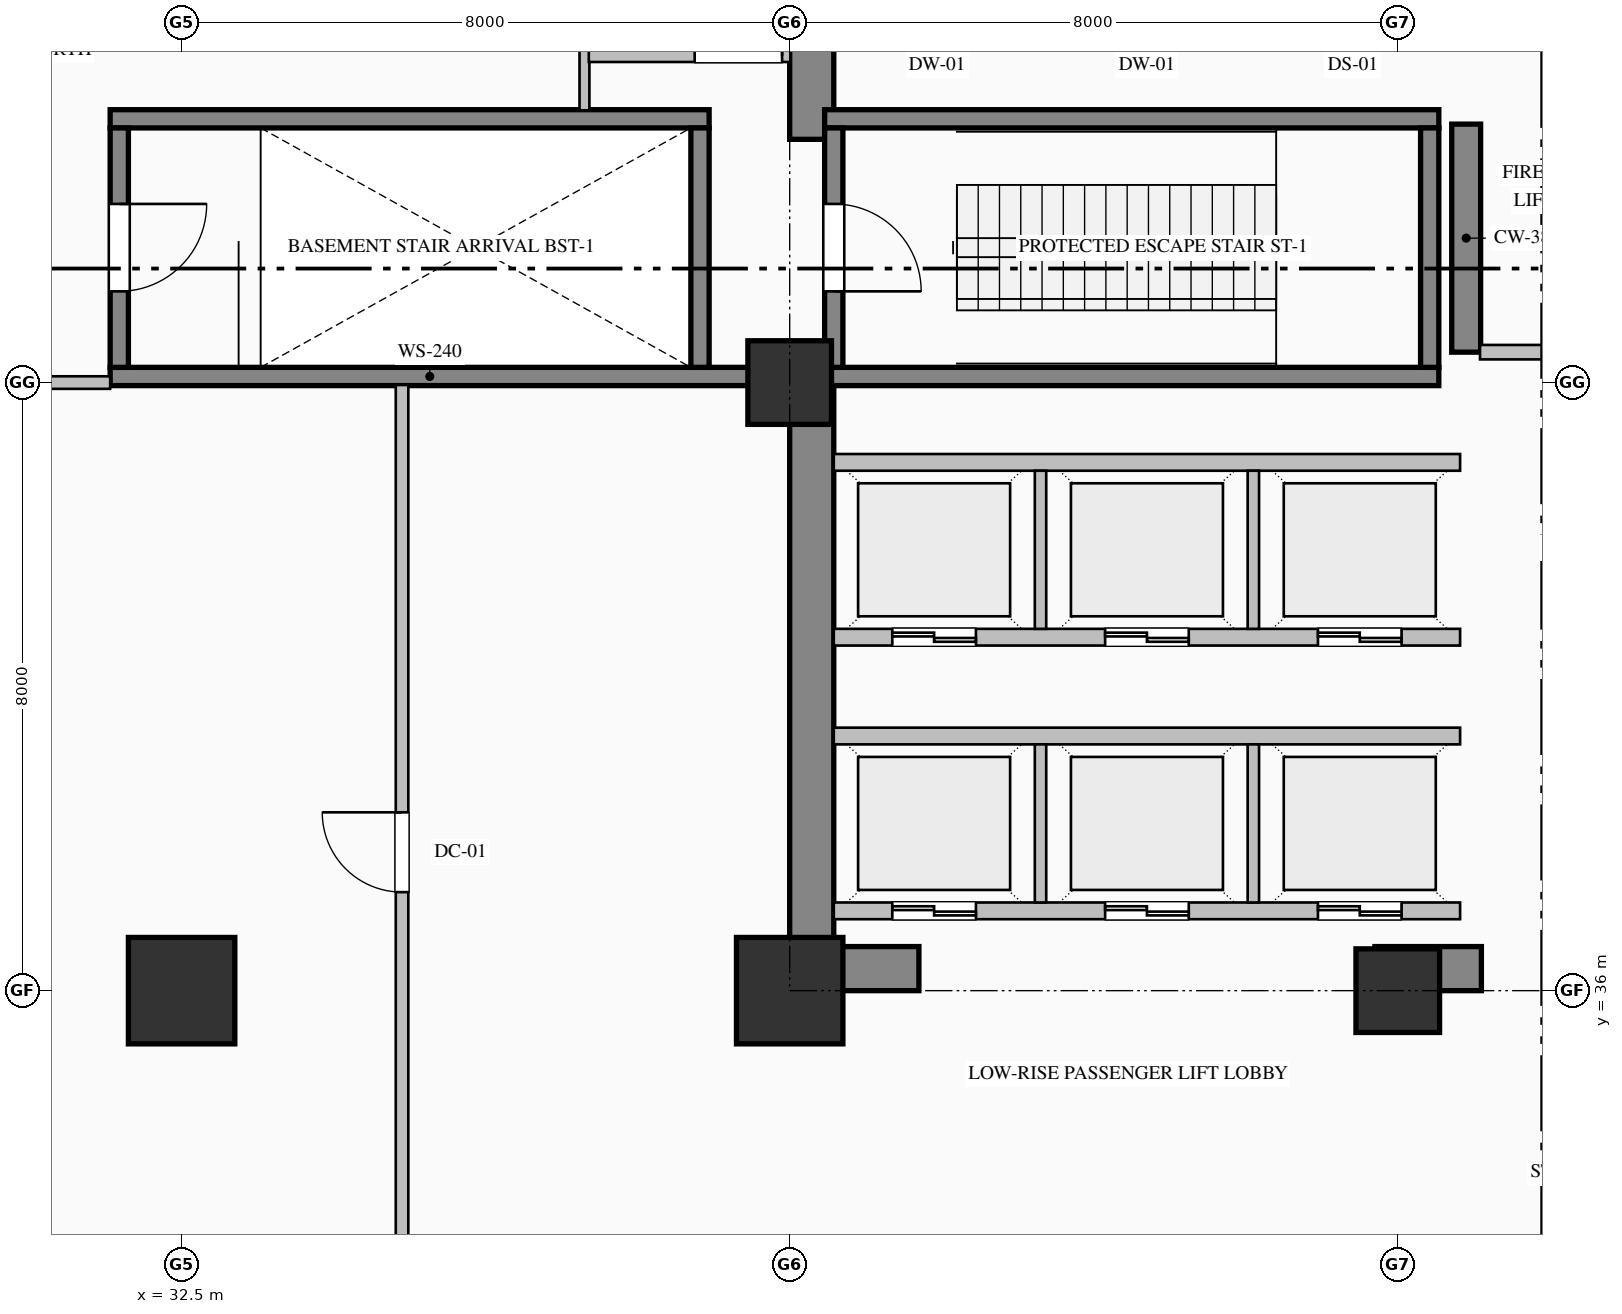
"""IFC4 building model, lengths in metres.
Left out: names, types, materials, properties, quantities, classifications, styles, units other than length and angle.
Written with IfcOpenShell. Run it as: python <this file> out.ifc"""

import sys

from ifc_helpers import new_model, si_unit, direction, frame, frame_2d, origin, origin_2d, place, context, subcontext, project, spatial, rectangle, hollow_rectangle, extrude, element, fill, save


model = new_model("IFC4")
c1 = context("Model", 3, precision=1e-05, world=origin(), true_north=direction((0.0, 1.0)))
c2 = subcontext(c1, "Body", "Model", "MODEL_VIEW")
j1 = project(units=[si_unit("LENGTHUNIT", "METRE"), si_unit("PLANEANGLEUNIT", "RADIAN")], contexts=[c1])
p1 = place(None, origin())
s1 = spatial("IfcSite", under=j1, at=p1, CompositionType="ELEMENT")
p2 = place(p1, origin())
s2 = spatial("IfcBuilding", under=s1, at=p2, CompositionType="ELEMENT")
p3 = place(p2, origin())
s3 = spatial("IfcBuildingStorey", under=s2, at=p3, CompositionType="ELEMENT", Elevation=0.0)
p4 = place(p3, frame((40.79, 36.58, 0.0), z_axis=(0.0, 0.0, 1.0), x_axis=(0.0, 1.0, 0.0)))
e1 = element("IfcWall", 1, at=p4, inside=s3, PredefinedType="SHEAR", context=c2, shape_type="SweptSolid", body=[
    extrude(rectangle(XDim=7.82, YDim=0.58, at=frame_2d((3.91, 0.0))), origin(), (0.0, 0.0, 1.0), 5.72),
])
p5 = place(p3, frame((40.79, 47.2, 0.0), z_axis=(0.0, 0.0, 1.0), x_axis=(0.0, 1.0, 0.0)))
e2 = element("IfcWall", 2, at=p5, inside=s3, PredefinedType="SHEAR", context=c2, shape_type="SweptSolid", body=[
    extrude(rectangle(XDim=4.22, YDim=0.58, at=frame_2d((2.11, 0.0))), origin(), (0.0, 0.0, 1.0), 5.72),
])
p6 = place(p3, frame((40.5, 36.29, 0.0), z_axis=(0.0, 0.0, 1.0), x_axis=(1.0, 0.0, 0.0)))
e3 = element("IfcWall", 3, at=p6, inside=s3, PredefinedType="SHEAR", context=c2, shape_type="SweptSolid", body=[
    extrude(rectangle(XDim=1.7, YDim=0.58, at=frame_2d((0.85, 0.0))), origin(), (0.0, 0.0, 1.0), 5.72),
])
p7 = place(p3, frame((48.2, 36.29, 0.0), z_axis=(0.0, 0.0, 1.0), x_axis=(1.0, 0.0, 0.0)))
e4 = element("IfcWall", 4, at=p7, inside=s3, PredefinedType="SHEAR", context=c2, shape_type="SweptSolid", body=[
    extrude(rectangle(XDim=1.4, YDim=0.58, at=frame_2d((0.7, 0.0))), origin(), (0.0, 0.0, 1.0), 5.72),
])
p8 = place(p3, frame((49.4, 44.4, 0.0), z_axis=(0.0, 0.0, 1.0), x_axis=(0.0, 1.0, 0.0)))
e5 = element("IfcWall", 5, at=p8, inside=s3, PredefinedType="SHEAR", context=c2, shape_type="SweptSolid", body=[
    extrude(rectangle(XDim=3.0, YDim=0.38, at=frame_2d((1.5, 0.0))), origin(), (0.0, 0.0, 1.0), 5.72),
])
for number, where, z_axis, x_axis in (
    (6, (32.5, 36.0, 0.0), (0.0, 0.0, 1.0), (1.0, 0.0, 0.0)),
    (7, (40.5, 36.0, 0.0), (0.0, 0.0, 1.0), (1.0, 0.0, 0.0)),
):
    element("IfcColumn", number, at=place(p3, frame(where, z_axis=z_axis, x_axis=x_axis)), inside=s3, PredefinedType="COLUMN", context=c2, shape_type="SweptSolid", body=[
        extrude(hollow_rectangle(XDim=1.4, YDim=1.4, WallThickness=0.05, at=origin_2d()), origin(), (0.0, 0.0, 1.0), 6.0),
    ])
for number, where, z_axis, x_axis in (
    (8, (40.5, 44.0, 0.0), (0.0, 0.0, 1.0), (1.0, 0.0, 0.0)),
    (9, (48.5, 36.0, 0.0), (0.0, 0.0, 1.0), (1.0, 0.0, 0.0)),
):
    element("IfcColumn", number, at=place(p3, frame(where, z_axis=z_axis, x_axis=x_axis)), inside=s3, PredefinedType="COLUMN", context=c2, shape_type="SweptSolid", body=[
        extrude(rectangle(XDim=1.1, YDim=1.1, at=origin_2d()), origin(), (0.0, 0.0, 1.0), 6.0),
    ])
for number, where, z_axis, x_axis in (
    (10, (40.96, 47.47, 0.0), (0.0, 0.0, 1.0), (1.0, 0.0, 0.0)),
    (11, (49.04, 44.08, 0.0), (0.0, 0.0, 1.0), (-1.0, 0.0, 0.0)),
):
    element("IfcWall", number, at=place(p3, frame(where, z_axis=z_axis, x_axis=x_axis)), inside=s3, PredefinedType="SOLIDWALL", context=c2, shape_type="SweptSolid", body=[
        extrude(rectangle(XDim=8.08, YDim=0.24, at=frame_2d((4.04, 0.0))), origin(), (0.0, 0.0, 1.0), 6.0),
    ])
p9 = place(p3, frame((41.08, 47.35, 0.0), z_axis=(0.0, 0.0, 1.0), x_axis=(0.0, -1.0, 0.0)))
e12 = element("IfcWall", 12, at=p9, inside=s3, PredefinedType="SOLIDWALL", context=c2, shape_type="SweptSolid", body=[
    extrude(rectangle(XDim=3.15, YDim=0.24, at=frame_2d((1.575, 0.0))), origin(), (0.0, 0.0, 1.0), 6.0),
])
p10 = place(p9, frame((1.0, 0.0, 0.0)))
e13 = element("IfcOpeningElement", 13, at=p10, cuts=e12, PredefinedType="OPENING", context=c2, shape_type="SweptSolid", body=[
    extrude(rectangle(XDim=1.15, YDim=2.2, at=frame_2d((0.575, 1.1))), frame((0.0, 0.13, 0.0), z_axis=(0.0, -1.0, 0.0), x_axis=(1.0, 0.0, 0.0)), (0.0, 0.0, 1.0), 0.26),
])
p11 = place(p3, frame((48.92, 44.2, 0.0), z_axis=(0.0, 0.0, 1.0), x_axis=(0.0, 1.0, 0.0)))
e14 = element("IfcWall", 14, at=p11, inside=s3, PredefinedType="SOLIDWALL", context=c2, shape_type="SweptSolid", body=[
    extrude(rectangle(XDim=3.15, YDim=0.24, at=frame_2d((1.575, 0.0))), origin(), (0.0, 0.0, 1.0), 6.0),
])
p12 = place(p3, frame((31.56, 47.47, 0.0), z_axis=(0.0, 0.0, 1.0), x_axis=(1.0, 0.0, 0.0)))
e15 = element("IfcWall", 15, at=p12, inside=s3, PredefinedType="SOLIDWALL", context=c2, shape_type="SweptSolid", body=[
    extrude(rectangle(XDim=7.88, YDim=0.24, at=frame_2d((3.94, 0.0))), origin(), (0.0, 0.0, 1.0), 6.0),
])
p13 = place(p3, frame((39.97, 44.08, 0.0), z_axis=(0.0, 0.0, 1.0), x_axis=(-1.0, 0.0, 0.0)))
e16 = element("IfcWall", 16, at=p13, inside=s3, PredefinedType="SOLIDWALL", context=c2, shape_type="SweptSolid", body=[
    extrude(rectangle(XDim=8.41, YDim=0.24, at=frame_2d((4.205, 0.0))), origin(), (0.0, 0.0, 1.0), 6.0),
])
p14 = place(p3, frame((31.68, 47.35, 0.0), z_axis=(0.0, 0.0, 1.0), x_axis=(0.0, -1.0, 0.0)))
e17 = element("IfcWall", 17, at=p14, inside=s3, PredefinedType="SOLIDWALL", context=c2, shape_type="SweptSolid", body=[
    extrude(rectangle(XDim=3.15, YDim=0.24, at=frame_2d((1.575, 0.0))), origin(), (0.0, 0.0, 1.0), 6.0),
])
p15 = place(p14, frame((1.0, 0.0, 0.0)))
e18 = element("IfcOpeningElement", 18, at=p15, cuts=e17, PredefinedType="OPENING", context=c2, shape_type="SweptSolid", body=[
    extrude(rectangle(XDim=1.15, YDim=2.2, at=frame_2d((0.575, 1.1))), frame((0.0, 0.13, 0.0), z_axis=(0.0, -1.0, 0.0), x_axis=(1.0, 0.0, 0.0)), (0.0, 0.0, 1.0), 0.26),
])
p16 = place(p3, frame((39.32, 44.2, 0.0), z_axis=(0.0, 0.0, 1.0), x_axis=(0.0, 1.0, 0.0)))
e19 = element("IfcWall", 19, at=p16, inside=s3, PredefinedType="SOLIDWALL", context=c2, shape_type="SweptSolid", body=[
    extrude(rectangle(XDim=3.15, YDim=0.24, at=frame_2d((1.575, 0.0))), origin(), (0.0, 0.0, 1.0), 6.0),
])
p17 = place(p3, frame((49.32, 37.05, 0.0), z_axis=(0.0, 0.0, 1.0), x_axis=(-1.0, 0.0, 0.0)))
e20 = element("IfcWall", 20, at=p17, inside=s3, PredefinedType="PARTITIONING", context=c2, shape_type="SweptSolid", body=[
    extrude(rectangle(XDim=8.24, YDim=0.22, at=frame_2d((4.12, 0.0))), origin(), (0.0, 0.0, 1.0), 5.72),
])
p18 = place(p17, frame((6.37, 0.0, 0.0)))
e21 = element("IfcOpeningElement", 21, at=p18, cuts=e20, PredefinedType="OPENING", context=c2, shape_type="SweptSolid", body=[
    extrude(rectangle(XDim=1.1, YDim=2.2, at=frame_2d((0.55, 1.1))), frame((0.0, 0.12, 0.0), z_axis=(0.0, -1.0, 0.0), x_axis=(1.0, 0.0, 0.0)), (0.0, 0.0, 1.0), 0.24),
])
p19 = place(p17, frame((3.57, 0.0, 0.0)))
e22 = element("IfcOpeningElement", 22, at=p19, cuts=e20, PredefinedType="OPENING", context=c2, shape_type="SweptSolid", body=[
    extrude(rectangle(XDim=1.1, YDim=2.2, at=frame_2d((0.55, 1.1))), frame((0.0, 0.12, 0.0), z_axis=(0.0, -1.0, 0.0), x_axis=(1.0, 0.0, 0.0)), (0.0, 0.0, 1.0), 0.24),
])
p20 = place(p17, frame((0.77, 0.0, 0.0)))
e23 = element("IfcOpeningElement", 23, at=p20, cuts=e20, PredefinedType="OPENING", context=c2, shape_type="SweptSolid", body=[
    extrude(rectangle(XDim=1.1, YDim=2.2, at=frame_2d((0.55, 1.1))), frame((0.0, 0.12, 0.0), z_axis=(0.0, -1.0, 0.0), x_axis=(1.0, 0.0, 0.0)), (0.0, 0.0, 1.0), 0.24),
])
p21 = place(p3, frame((41.08, 39.35, 0.0), z_axis=(0.0, 0.0, 1.0), x_axis=(1.0, 0.0, 0.0)))
e24 = element("IfcWall", 24, at=p21, inside=s3, PredefinedType="PARTITIONING", context=c2, shape_type="SweptSolid", body=[
    extrude(rectangle(XDim=8.24, YDim=0.22, at=frame_2d((4.12, 0.0))), origin(), (0.0, 0.0, 1.0), 5.72),
])
for number, where, z_axis, x_axis in (
    (25, (43.8, 37.16, 0.0), (0.0, 0.0, 1.0), (0.0, 1.0, 0.0)),
    (26, (46.6, 37.16, 0.0), (0.0, 0.0, 1.0), (0.0, 1.0, 0.0)),
):
    element("IfcWall", number, at=place(p3, frame(where, z_axis=z_axis, x_axis=x_axis)), inside=s3, PredefinedType="PARTITIONING", context=c2, shape_type="SweptSolid", body=[
        extrude(rectangle(XDim=2.08, YDim=0.15, at=frame_2d((1.04, 0.0))), origin(), (0.0, 0.0, 1.0), 5.72),
    ])
p22 = place(p3, frame((49.32, 40.65, 0.0), z_axis=(0.0, 0.0, 1.0), x_axis=(-1.0, 0.0, 0.0)))
e27 = element("IfcWall", 27, at=p22, inside=s3, PredefinedType="PARTITIONING", context=c2, shape_type="SweptSolid", body=[
    extrude(rectangle(XDim=8.24, YDim=0.22, at=frame_2d((4.12, 0.0))), origin(), (0.0, 0.0, 1.0), 5.72),
])
p23 = place(p22, frame((6.37, 0.0, 0.0)))
e28 = element("IfcOpeningElement", 28, at=p23, cuts=e27, PredefinedType="OPENING", context=c2, shape_type="SweptSolid", body=[
    extrude(rectangle(XDim=1.1, YDim=2.2, at=frame_2d((0.55, 1.1))), frame((0.0, 0.12, 0.0), z_axis=(0.0, -1.0, 0.0), x_axis=(1.0, 0.0, 0.0)), (0.0, 0.0, 1.0), 0.24),
])
p24 = place(p22, frame((3.57, 0.0, 0.0)))
e29 = element("IfcOpeningElement", 29, at=p24, cuts=e27, PredefinedType="OPENING", context=c2, shape_type="SweptSolid", body=[
    extrude(rectangle(XDim=1.1, YDim=2.2, at=frame_2d((0.55, 1.1))), frame((0.0, 0.12, 0.0), z_axis=(0.0, -1.0, 0.0), x_axis=(1.0, 0.0, 0.0)), (0.0, 0.0, 1.0), 0.24),
])
p25 = place(p22, frame((0.77, 0.0, 0.0)))
e30 = element("IfcOpeningElement", 30, at=p25, cuts=e27, PredefinedType="OPENING", context=c2, shape_type="SweptSolid", body=[
    extrude(rectangle(XDim=1.1, YDim=2.2, at=frame_2d((0.55, 1.1))), frame((0.0, 0.12, 0.0), z_axis=(0.0, -1.0, 0.0), x_axis=(1.0, 0.0, 0.0)), (0.0, 0.0, 1.0), 0.24),
])
p26 = place(p3, frame((41.08, 42.95, 0.0), z_axis=(0.0, 0.0, 1.0), x_axis=(1.0, 0.0, 0.0)))
e31 = element("IfcWall", 31, at=p26, inside=s3, PredefinedType="PARTITIONING", context=c2, shape_type="SweptSolid", body=[
    extrude(rectangle(XDim=8.24, YDim=0.22, at=frame_2d((4.12, 0.0))), origin(), (0.0, 0.0, 1.0), 5.72),
])
for number, where, z_axis, x_axis in (
    (32, (43.8, 40.76, 0.0), (0.0, 0.0, 1.0), (0.0, 1.0, 0.0)),
    (33, (46.6, 40.76, 0.0), (0.0, 0.0, 1.0), (0.0, 1.0, 0.0)),
):
    element("IfcWall", number, at=place(p3, frame(where, z_axis=z_axis, x_axis=x_axis)), inside=s3, PredefinedType="PARTITIONING", context=c2, shape_type="SweptSolid", body=[
        extrude(rectangle(XDim=2.08, YDim=0.15, at=frame_2d((1.04, 0.0))), origin(), (0.0, 0.0, 1.0), 5.72),
    ])
p27 = place(p3, frame((37.8, 47.582, 0.0), z_axis=(0.0, 0.0, 1.0), x_axis=(0.0, 1.0, 0.0)))
e34 = element("IfcWall", 34, at=p27, inside=s3, PredefinedType="PARTITIONING", context=c2, shape_type="SweptSolid", body=[
    extrude(rectangle(XDim=4.046, YDim=0.13, at=frame_2d((2.023, 0.0))), origin(), (0.0, 0.0, 1.0), 5.72),
])
p28 = place(p27, frame((1.513, 0.0, 0.0)))
e35 = element("IfcOpeningElement", 35, at=p28, cuts=e34, PredefinedType="OPENING", context=c2, shape_type="SweptSolid", body=[
    extrude(rectangle(XDim=1.02, YDim=2.15, at=frame_2d((0.51, 1.075))), frame((0.0, 0.075, 0.0), z_axis=(0.0, -1.0, 0.0), x_axis=(1.0, 0.0, 0.0)), (0.0, 0.0, 1.0), 0.15),
])
p29 = place(p3, frame((54.718, 44.4, 0.0), z_axis=(0.0, 0.0, 1.0), x_axis=(-1.0, 0.0, 0.0)))
e36 = element("IfcWall", 36, at=p29, inside=s3, PredefinedType="PARTITIONING", context=c2, shape_type="SweptSolid", body=[
    extrude(rectangle(XDim=5.136, YDim=0.19, at=frame_2d((2.568, 0.0))), origin(), (0.0, 0.0, 1.0), 5.72),
])
p30 = place(p29, frame((2.043, 0.0, 0.0)))
e37 = element("IfcOpeningElement", 37, at=p30, cuts=e36, PredefinedType="OPENING", context=c2, shape_type="SweptSolid", body=[
    extrude(rectangle(XDim=1.05, YDim=2.15, at=frame_2d((0.525, 1.075))), frame((0.0, 0.105, 0.0), z_axis=(0.0, -1.0, 0.0), x_axis=(1.0, 0.0, 0.0)), (0.0, 0.0, 1.0), 0.21),
])
p31 = place(p3, frame((31.56, 44.0, 0.0), z_axis=(0.0, 0.0, 1.0), x_axis=(-1.0, 0.0, 0.0)))
e38 = element("IfcWall", 38, at=p31, inside=s3, PredefinedType="PARTITIONING", context=c2, shape_type="SweptSolid", body=[
    extrude(rectangle(XDim=2.76, YDim=0.165, at=frame_2d((1.38, 0.0))), origin(), (0.0, 0.0, 1.0), 5.72),
])
p32 = place(p31, frame((0.855, 0.0, 0.0)))
e39 = element("IfcOpeningElement", 39, at=p32, cuts=e38, PredefinedType="OPENING", context=c2, shape_type="SweptSolid", body=[
    extrude(rectangle(XDim=1.05, YDim=2.15, at=frame_2d((0.525, 1.075))), frame((0.0, 0.093, 0.0), z_axis=(0.0, -1.0, 0.0), x_axis=(1.0, 0.0, 0.0)), (0.0, 0.0, 1.0), 0.185),
])
p33 = place(p3, frame((35.4, 31.675, 0.0), z_axis=(0.0, 0.0, 1.0), x_axis=(0.0, 1.0, 0.0)))
e40 = element("IfcWall", 40, at=p33, inside=s3, PredefinedType="PARTITIONING", context=c2, shape_type="SweptSolid", body=[
    extrude(rectangle(XDim=12.293, YDim=0.165, at=frame_2d((6.147, 0.0))), origin(), (0.0, 0.0, 1.0), 5.72),
])
p34 = place(p33, frame((5.622, 0.0, 0.0)))
e41 = element("IfcOpeningElement", 41, at=p34, cuts=e40, PredefinedType="OPENING", context=c2, shape_type="SweptSolid", body=[
    extrude(rectangle(XDim=1.05, YDim=2.15, at=frame_2d((0.525, 1.075))), frame((0.0, 0.093, 0.0), z_axis=(0.0, -1.0, 0.0), x_axis=(1.0, 0.0, 0.0)), (0.0, 0.0, 1.0), 0.185),
])
p35 = place(p3, frame((37.857, 48.3, 0.0), z_axis=(0.0, 0.0, 1.0), x_axis=(1.0, 0.0, 0.0)))
e42 = element("IfcWall", 42, at=p35, inside=s3, PredefinedType="PARTITIONING", context=c2, shape_type="SweptSolid", body=[
    extrude(rectangle(XDim=2.651, YDim=0.165, at=frame_2d((1.326, 0.0))), origin(), (0.0, 0.0, 1.0), 5.72),
])
p36 = place(p35, frame((1.393, 0.0, 0.0)))
e43 = element("IfcOpeningElement", 43, at=p36, cuts=e42, PredefinedType="OPENING", context=c2, shape_type="SweptSolid", body=[
    extrude(rectangle(XDim=1.15, YDim=2.2, at=frame_2d((0.575, 1.1))), frame((0.0, 0.093, 0.0), z_axis=(0.0, -1.0, 0.0), x_axis=(1.0, 0.0, 0.0)), (0.0, 0.0, 1.0), 0.185),
])
p37 = place(p10, origin())
e44 = element("IfcDoor", 44, at=p37, inside=s3, OperationType="SINGLE_SWING_RIGHT", PredefinedType="DOOR", context=c2, shape_type="SweptSolid", body=[
    extrude(rectangle(XDim=1.15, YDim=2.2, at=frame_2d((0.575, 1.1))), frame((0.0, 0.025, 0.0), z_axis=(0.0, -1.0, 0.0), x_axis=(1.0, 0.0, 0.0)), (0.0, 0.0, 1.0), 0.05),
])
fill(e13, e44)
p38 = place(p15, origin())
e45 = element("IfcDoor", 45, at=p38, inside=s3, OperationType="SINGLE_SWING_LEFT", PredefinedType="DOOR", context=c2, shape_type="SweptSolid", body=[
    extrude(rectangle(XDim=1.15, YDim=2.2, at=frame_2d((0.575, 1.1))), frame((0.0, 0.025, 0.0), z_axis=(0.0, -1.0, 0.0), x_axis=(1.0, 0.0, 0.0)), (0.0, 0.0, 1.0), 0.05),
])
fill(e18, e45)
p39 = place(p18, origin())
e46 = element("IfcDoor", 46, at=p39, inside=s3, OperationType="DOUBLE_DOOR_SLIDING", PredefinedType="DOOR", context=c2, shape_type="SweptSolid", body=[
    extrude(rectangle(XDim=1.1, YDim=2.2, at=frame_2d((0.55, 1.1))), frame((0.0, 0.025, 0.0), z_axis=(0.0, -1.0, 0.0), x_axis=(1.0, 0.0, 0.0)), (0.0, 0.0, 1.0), 0.05),
])
fill(e21, e46)
p40 = place(p19, origin())
e47 = element("IfcDoor", 47, at=p40, inside=s3, OperationType="DOUBLE_DOOR_SLIDING", PredefinedType="DOOR", context=c2, shape_type="SweptSolid", body=[
    extrude(rectangle(XDim=1.1, YDim=2.2, at=frame_2d((0.55, 1.1))), frame((0.0, 0.025, 0.0), z_axis=(0.0, -1.0, 0.0), x_axis=(1.0, 0.0, 0.0)), (0.0, 0.0, 1.0), 0.05),
])
fill(e22, e47)
p41 = place(p20, origin())
e48 = element("IfcDoor", 48, at=p41, inside=s3, OperationType="DOUBLE_DOOR_SLIDING", PredefinedType="DOOR", context=c2, shape_type="SweptSolid", body=[
    extrude(rectangle(XDim=1.1, YDim=2.2, at=frame_2d((0.55, 1.1))), frame((0.0, 0.025, 0.0), z_axis=(0.0, -1.0, 0.0), x_axis=(1.0, 0.0, 0.0)), (0.0, 0.0, 1.0), 0.05),
])
fill(e23, e48)
p42 = place(p23, origin())
e49 = element("IfcDoor", 49, at=p42, inside=s3, OperationType="DOUBLE_DOOR_SLIDING", PredefinedType="DOOR", context=c2, shape_type="SweptSolid", body=[
    extrude(rectangle(XDim=1.1, YDim=2.2, at=frame_2d((0.55, 1.1))), frame((0.0, 0.025, 0.0), z_axis=(0.0, -1.0, 0.0), x_axis=(1.0, 0.0, 0.0)), (0.0, 0.0, 1.0), 0.05),
])
fill(e28, e49)
p43 = place(p24, origin())
e50 = element("IfcDoor", 50, at=p43, inside=s3, OperationType="DOUBLE_DOOR_SLIDING", PredefinedType="DOOR", context=c2, shape_type="SweptSolid", body=[
    extrude(rectangle(XDim=1.1, YDim=2.2, at=frame_2d((0.55, 1.1))), frame((0.0, 0.025, 0.0), z_axis=(0.0, -1.0, 0.0), x_axis=(1.0, 0.0, 0.0)), (0.0, 0.0, 1.0), 0.05),
])
fill(e29, e50)
p44 = place(p25, origin())
e51 = element("IfcDoor", 51, at=p44, inside=s3, OperationType="DOUBLE_DOOR_SLIDING", PredefinedType="DOOR", context=c2, shape_type="SweptSolid", body=[
    extrude(rectangle(XDim=1.1, YDim=2.2, at=frame_2d((0.55, 1.1))), frame((0.0, 0.025, 0.0), z_axis=(0.0, -1.0, 0.0), x_axis=(1.0, 0.0, 0.0)), (0.0, 0.0, 1.0), 0.05),
])
fill(e30, e51)
p45 = place(p34, origin())
e52 = element("IfcDoor", 52, at=p45, inside=s3, OperationType="SINGLE_SWING_RIGHT", PredefinedType="DOOR", context=c2, shape_type="SweptSolid", body=[
    extrude(rectangle(XDim=1.05, YDim=2.15, at=frame_2d((0.525, 1.075))), frame((0.0, 0.025, 0.0), z_axis=(0.0, -1.0, 0.0), x_axis=(1.0, 0.0, 0.0)), (0.0, 0.0, 1.0), 0.05),
])
fill(e41, e52)
p46 = place(p36, origin())
e53 = element("IfcDoor", 53, at=p46, inside=s3, OperationType="SINGLE_SWING_RIGHT", PredefinedType="DOOR", context=c2, shape_type="SweptSolid", body=[
    extrude(rectangle(XDim=1.15, YDim=2.2, at=frame_2d((0.575, 1.1))), frame((0.0, 0.025, 0.0), z_axis=(0.0, -1.0, 0.0), x_axis=(1.0, 0.0, 0.0)), (0.0, 0.0, 1.0), 0.05),
])
fill(e43, e53)
save(model, sys.argv[1])
